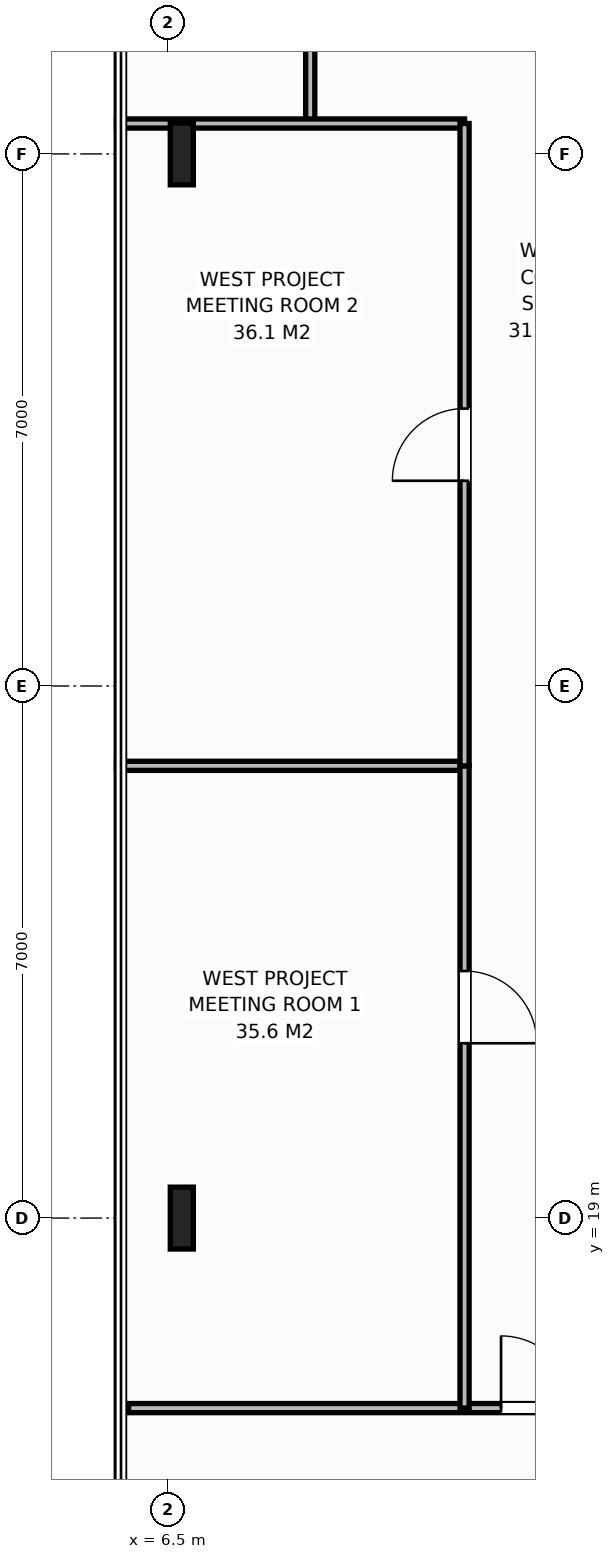
"""IFC4 building model, lengths in metres.
Left out: names, types, materials, properties, quantities, classifications, styles, units other than length and angle.
Written with IfcOpenShell. Run it as: python <this file> out.ifc"""

import sys

from ifc_helpers import new_model, si_unit, direction, frame, frame_2d, origin, origin_2d, place, context, subcontext, project, spatial, rectangle, i_section, extrude, element, fill, save


model = new_model("IFC4")
c1 = context("Model", 3, precision=1e-05, world=origin(), true_north=direction((0.0, 1.0)))
c2 = subcontext(c1, "Body", "Model", "MODEL_VIEW")
j1 = project(units=[si_unit("LENGTHUNIT", "METRE"), si_unit("PLANEANGLEUNIT", "RADIAN")], contexts=[c1])
p1 = place(None, origin())
s1 = spatial("IfcSite", under=j1, at=p1, CompositionType="ELEMENT")
p2 = place(p1, origin())
s2 = spatial("IfcBuilding", under=s1, at=p2, CompositionType="ELEMENT")
p3 = place(p2, frame((0.0, 0.0, 251.8)))
s3 = spatial("IfcBuildingStorey", under=s2, at=p3, CompositionType="ELEMENT", Elevation=251.8)
for number, where, z_axis, x_axis in (
    (1, (6.68, 19.0, 0.0), (0.0, 0.0, 1.0), (1.0, 0.0, 0.0)),
    (2, (6.68, 33.0, 0.0), (0.0, 0.0, 1.0), (1.0, 0.0, 0.0)),
):
    element("IfcColumn", number, at=place(p3, frame(where, z_axis=z_axis, x_axis=x_axis)), inside=s3, PredefinedType="COLUMN", context=c2, shape_type="SweptSolid", body=[
        extrude(i_section(OverallWidth=0.303, OverallDepth=0.814, WebThickness=0.021, FlangeThickness=0.04, at=origin_2d()), origin(), (0.0, 0.0, 1.0), 3.8),
    ])
p4 = place(p3, frame((8.37, 33.4, 0.0), z_axis=(0.0, 0.0, 1.0), x_axis=(0.0, 1.0, 0.0)))
e3 = element("IfcWall", 3, at=p4, inside=s3, PredefinedType="PARTITIONING", context=c2, shape_type="SweptSolid", body=[
    extrude(rectangle(XDim=2.1, YDim=0.12, at=frame_2d((1.05, 0.0))), origin(), (0.0, 0.0, 1.0), 3.588),
])
p5 = place(p3, frame((5.98, 16.5, 0.0), z_axis=(0.0, 0.0, 1.0), x_axis=(1.0, 0.0, 0.0)))
e4 = element("IfcWall", 4, at=p5, inside=s3, PredefinedType="PARTITIONING", context=c2, shape_type="SweptSolid", body=[
    extrude(rectangle(XDim=7.957, YDim=0.12, at=frame_2d((3.979, 0.0))), origin(), (0.0, 0.0, 1.0), 3.588),
])
p6 = place(p5, frame((4.9, 0.0, 0.0)))
e5 = element("IfcOpeningElement", 5, at=p6, cuts=e4, PredefinedType="OPENING", context=c2, shape_type="SweptSolid", body=[
    extrude(rectangle(XDim=0.95, YDim=2.15, at=frame_2d((0.475, 1.075))), frame((0.0, 0.07, 0.0), z_axis=(0.0, -1.0, 0.0), x_axis=(1.0, 0.0, 0.0)), (0.0, 0.0, 1.0), 0.14),
])
p7 = place(p3, frame((5.82, 33.4, 0.0), z_axis=(0.0, 0.0, 1.0), x_axis=(1.0, 0.0, 0.0)))
e6 = element("IfcWall", 6, at=p7, inside=s3, PredefinedType="PARTITIONING", context=c2, shape_type="SweptSolid", body=[
    extrude(rectangle(XDim=4.58, YDim=0.12, at=frame_2d((2.29, 0.0))), origin(), (0.0, 0.0, 1.0), 2.388),
])
p8 = place(p3, frame((5.82, 24.95, 0.0), z_axis=(0.0, 0.0, 1.0), x_axis=(1.0, 0.0, 0.0)))
e7 = element("IfcWall", 7, at=p8, inside=s3, PredefinedType="PARTITIONING", context=c2, shape_type="SweptSolid", body=[
    extrude(rectangle(XDim=4.58, YDim=0.12, at=frame_2d((2.29, 0.0))), origin(), (0.0, 0.0, 1.0), 3.588),
])
p9 = place(p3, frame((10.4, 16.5, 0.0), z_axis=(0.0, 0.0, 1.0), x_axis=(0.0, 1.0, 0.0)))
e8 = element("IfcWall", 8, at=p9, inside=s3, PredefinedType="PARTITIONING", context=c2, shape_type="SweptSolid", body=[
    extrude(rectangle(XDim=8.45, YDim=0.12, at=frame_2d((4.225, 0.0))), origin(), (0.0, 0.0, 1.0), 3.588),
])
p10 = place(p9, frame((4.8, 0.0, 0.0)))
e9 = element("IfcOpeningElement", 9, at=p10, cuts=e8, PredefinedType="OPENING", context=c2, shape_type="SweptSolid", body=[
    extrude(rectangle(XDim=0.95, YDim=2.15, at=frame_2d((0.475, 1.075))), frame((0.0, 0.07, 0.0), z_axis=(0.0, -1.0, 0.0), x_axis=(1.0, 0.0, 0.0)), (0.0, 0.0, 1.0), 0.14),
])
p11 = place(p3, frame((10.4, 24.95, 0.0), z_axis=(0.0, 0.0, 1.0), x_axis=(0.0, 1.0, 0.0)))
e10 = element("IfcWall", 10, at=p11, inside=s3, PredefinedType="PARTITIONING", context=c2, shape_type="SweptSolid", body=[
    extrude(rectangle(XDim=8.45, YDim=0.12, at=frame_2d((4.225, 0.0))), origin(), (0.0, 0.0, 1.0), 3.588),
])
p12 = place(p11, frame((3.75, 0.0, 0.0)))
e11 = element("IfcOpeningElement", 11, at=p12, cuts=e10, PredefinedType="OPENING", context=c2, shape_type="SweptSolid", body=[
    extrude(rectangle(XDim=0.95, YDim=2.15, at=frame_2d((0.475, 1.075))), frame((0.0, 0.07, 0.0), z_axis=(0.0, -1.0, 0.0), x_axis=(1.0, 0.0, 0.0)), (0.0, 0.0, 1.0), 0.14),
])
p13 = place(p6, origin())
e12 = element("IfcDoor", 12, at=p13, inside=s3, OperationType="SINGLE_SWING_LEFT", PredefinedType="DOOR", context=c2, shape_type="SweptSolid", body=[
    extrude(rectangle(XDim=0.95, YDim=2.15, at=frame_2d((0.475, 1.075))), frame((0.0, 0.025, 0.0), z_axis=(0.0, -1.0, 0.0), x_axis=(1.0, 0.0, 0.0)), (0.0, 0.0, 1.0), 0.05),
])
fill(e5, e12)
p14 = place(p10, origin())
e13 = element("IfcDoor", 13, at=p14, inside=s3, OperationType="SINGLE_SWING_RIGHT", PredefinedType="DOOR", context=c2, shape_type="SweptSolid", body=[
    extrude(rectangle(XDim=0.95, YDim=2.15, at=frame_2d((0.475, 1.075))), frame((0.0, 0.025, 0.0), z_axis=(0.0, -1.0, 0.0), x_axis=(1.0, 0.0, 0.0)), (0.0, 0.0, 1.0), 0.05),
])
fill(e9, e13)
p15 = place(p12, origin())
e14 = element("IfcDoor", 14, at=p15, inside=s3, OperationType="SINGLE_SWING_LEFT", PredefinedType="DOOR", context=c2, shape_type="SweptSolid", body=[
    extrude(rectangle(XDim=0.95, YDim=2.15, at=frame_2d((0.475, 1.075))), frame((0.0, 0.025, 0.0), z_axis=(0.0, -1.0, 0.0), x_axis=(1.0, 0.0, 0.0)), (0.0, 0.0, 1.0), 0.05),
])
fill(e11, e14)
save(model, sys.argv[1])
